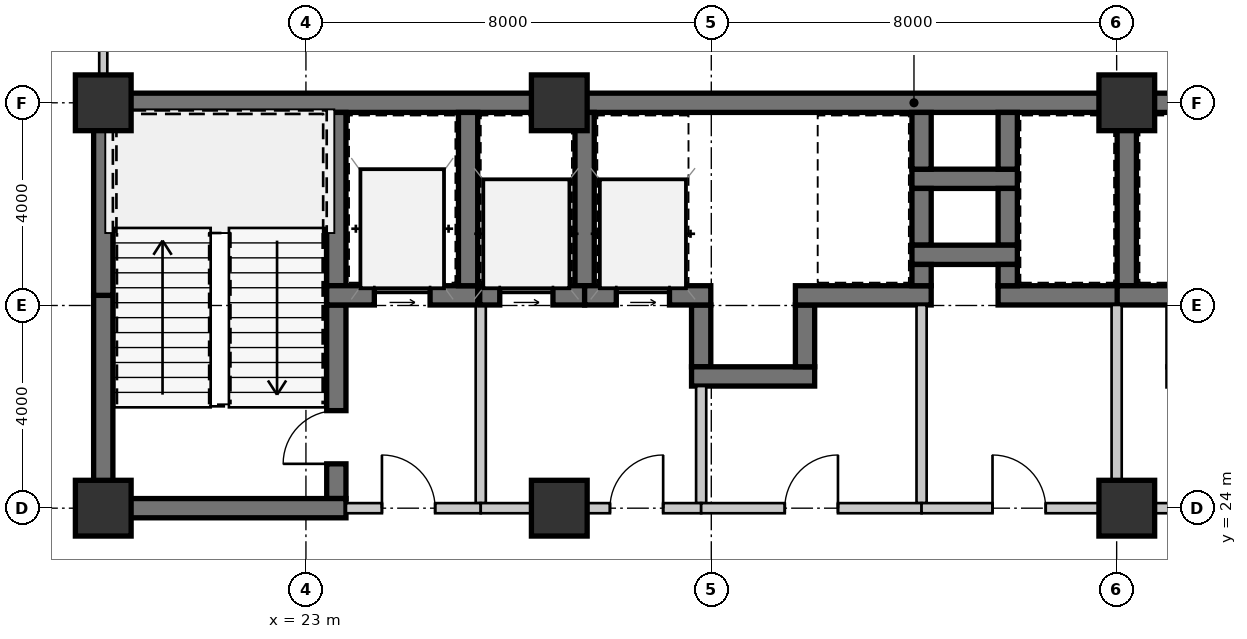
"""IFC4 building model, lengths in metres.
Left out: names, types, materials, properties, quantities, classifications, styles, units other than length and angle.
Written with IfcOpenShell. Run it as: python <this file> out.ifc"""

import sys

from ifc_helpers import new_model, si_unit, direction, frame, frame_2d, origin, origin_2d, place, context, subcontext, project, spatial, rectangle, extrude, source, transform, mapped, element, fill, save


model = new_model("IFC4")
c1 = context("Model", 3, precision=1e-05, world=origin(), true_north=direction((0.0, 1.0)))
c2 = subcontext(c1, "Body", "Model", "MODEL_VIEW")
j1 = project(units=[si_unit("LENGTHUNIT", "METRE"), si_unit("PLANEANGLEUNIT", "RADIAN")], contexts=[c1])
p1 = place(None, origin())
s1 = spatial("IfcSite", under=j1, at=p1, CompositionType="ELEMENT")
p2 = place(p1, origin())
s2 = spatial("IfcBuilding", under=s1, at=p2, CompositionType="ELEMENT")
p3 = place(p2, frame((0.0, 0.0, 8.4)))
s3 = spatial("IfcBuildingStorey", under=s2, at=p3, CompositionType="ELEMENT", Elevation=8.4)
m1 = source(origin(), c2, "Body", "SweptSolid", [
    extrude(rectangle(XDim=1.1, YDim=1.1, at=origin_2d()), origin(), (0.0, 0.0, 1.0), 4.55),
])
for number, where, z_axis, x_axis in (
    (1, (19.0, 24.0, 0.0), (0.0, 0.0, 1.0), (1.0, 0.0, 0.0)),
    (2, (28.0, 24.0, 0.0), (0.0, 0.0, 1.0), (1.0, 0.0, 0.0)),
    (3, (39.2, 24.0, 0.0), (0.0, 0.0, 1.0), (1.0, 0.0, 0.0)),
    (4, (19.0, 32.0, 0.0), (0.0, 0.0, 1.0), (1.0, 0.0, 0.0)),
    (5, (28.0, 32.0, 0.0), (0.0, 0.0, 1.0), (1.0, 0.0, 0.0)),
    (6, (39.2, 32.0, 0.0), (0.0, 0.0, 1.0), (1.0, 0.0, 0.0)),
):
    element("IfcColumn", number, at=place(p3, frame(where, z_axis=z_axis, x_axis=x_axis)), inside=s3, PredefinedType="COLUMN", context=c2, shape_type="MappedRepresentation", body=[
        mapped(m1, transform((0.0, 0.0, 0.0), scale=1.0)),
    ])
m2 = source(origin(), c2, "Body", "SweptSolid", [
    extrude(rectangle(XDim=9.19, YDim=0.38, at=frame_2d((4.595, 0.0))), origin(), (0.0, 0.0, 1.0), 4.29),
])
p4 = place(p3, frame((18.81, 32.0, 0.0), z_axis=(0.0, 0.0, 1.0), x_axis=(1.0, 0.0, 0.0)))
e7 = element("IfcWall", 7, at=p4, inside=s3, PredefinedType="SHEAR", context=c2, shape_type="MappedRepresentation", body=[
    mapped(m2, transform((0.0, 0.0, 0.0), scale=1.0)),
])
m3 = source(origin(), c2, "Body", "SweptSolid", [
    extrude(rectangle(XDim=11.2, YDim=0.38, at=frame_2d((5.6, 0.0))), origin(), (0.0, 0.0, 1.0), 4.29),
])
p5 = place(p3, frame((28.0, 32.0, 0.0), z_axis=(0.0, 0.0, 1.0), x_axis=(1.0, 0.0, 0.0)))
e8 = element("IfcWall", 8, at=p5, inside=s3, PredefinedType="SHEAR", context=c2, shape_type="MappedRepresentation", body=[
    mapped(m3, transform((0.0, 0.0, 0.0), scale=1.0)),
])
m4 = source(origin(), c2, "Body", "SweptSolid", [
    extrude(rectangle(XDim=11.99, YDim=0.38, at=frame_2d((5.995, 0.0))), origin(), (0.0, 0.0, 1.0), 4.29),
])
p6 = place(p3, frame((39.2, 32.0, 0.0), z_axis=(0.0, 0.0, 1.0), x_axis=(1.0, 0.0, 0.0)))
e9 = element("IfcWall", 9, at=p6, inside=s3, PredefinedType="SHEAR", context=c2, shape_type="MappedRepresentation", body=[
    mapped(m4, transform((0.0, 0.0, 0.0), scale=1.0)),
])
m5 = source(origin(), c2, "Body", "SweptSolid", [
    extrude(rectangle(XDim=4.01, YDim=0.38, at=frame_2d((2.005, 0.0))), origin(), (0.0, 0.0, 1.0), 4.29),
])
p7 = place(p3, frame((19.0, 24.19, 0.0), z_axis=(0.0, 0.0, 1.0), x_axis=(0.0, 1.0, 0.0)))
e10 = element("IfcWall", 10, at=p7, inside=s3, PredefinedType="SHEAR", context=c2, shape_type="MappedRepresentation", body=[
    mapped(m5, transform((0.0, 0.0, 0.0), scale=1.0)),
])
m6 = source(origin(), c2, "Body", "SweptSolid", [
    extrude(rectangle(XDim=3.61, YDim=0.38, at=frame_2d((1.805, 0.0))), origin(), (0.0, 0.0, 1.0), 4.29),
])
p8 = place(p3, frame((19.0, 28.2, 0.0), z_axis=(0.0, 0.0, 1.0), x_axis=(0.0, 1.0, 0.0)))
e11 = element("IfcWall", 11, at=p8, inside=s3, PredefinedType="SHEAR", context=c2, shape_type="MappedRepresentation", body=[
    mapped(m6, transform((0.0, 0.0, 0.0), scale=1.0)),
])
m7 = source(origin(), c2, "Body", "SweptSolid", [
    extrude(rectangle(XDim=3.42, YDim=0.38, at=frame_2d((1.71, 0.0))), origin(), (0.0, 0.0, 1.0), 4.29),
])
p9 = place(p3, frame((23.6, 28.39, 0.0), z_axis=(0.0, 0.0, 1.0), x_axis=(0.0, 1.0, 0.0)))
e12 = element("IfcWall", 12, at=p9, inside=s3, PredefinedType="SHEAR", context=c2, shape_type="MappedRepresentation", body=[
    mapped(m7, transform((0.0, 0.0, 0.0), scale=1.0)),
])
m8 = source(origin(), c2, "Body", "SweptSolid", [
    extrude(rectangle(XDim=3.82, YDim=0.38, at=frame_2d((1.91, 0.0))), origin(), (0.0, 0.0, 1.0), 4.29),
])
p10 = place(p3, frame((23.6, 24.19, 0.0), z_axis=(0.0, 0.0, 1.0), x_axis=(0.0, 1.0, 0.0)))
e13 = element("IfcWall", 13, at=p10, inside=s3, PredefinedType="SHEAR", context=c2, shape_type="MappedRepresentation", body=[
    mapped(m8, transform((0.0, 0.0, 0.0), scale=1.0)),
])
m9 = source(origin(), c2, "Body", "SweptSolid", [
    extrude(rectangle(XDim=1.05, YDim=2.1, at=frame_2d((0.525, 1.05))), frame((0.0, 0.2, 0.0), z_axis=(0.0, -1.0, 0.0), x_axis=(1.0, 0.0, 0.0)), (0.0, 0.0, 1.0), 0.4),
])
p11 = place(p10, frame((0.685, 0.0, 0.0)))
e14 = element("IfcOpeningElement", 14, at=p11, cuts=e13, PredefinedType="OPENING", context=c2, shape_type="MappedRepresentation", body=[
    mapped(m9, transform((0.0, 0.0, 0.0), scale=1.0)),
])
m10 = source(origin(), c2, "Body", "SweptSolid", [
    extrude(rectangle(XDim=4.98, YDim=0.38, at=frame_2d((2.49, 0.0))), origin(), (0.0, 0.0, 1.0), 4.29),
])
p12 = place(p3, frame((18.81, 24.0, 0.0), z_axis=(0.0, 0.0, 1.0), x_axis=(1.0, 0.0, 0.0)))
e15 = element("IfcWall", 15, at=p12, inside=s3, PredefinedType="SHEAR", context=c2, shape_type="MappedRepresentation", body=[
    mapped(m10, transform((0.0, 0.0, 0.0), scale=1.0)),
])
m11 = source(origin(), c2, "Body", "SweptSolid", [
    extrude(rectangle(XDim=2.98, YDim=0.38, at=frame_2d((1.49, 0.0))), origin(), (0.0, 0.0, 1.0), 4.29),
])
p13 = place(p3, frame((23.41, 28.2, 0.0), z_axis=(0.0, 0.0, 1.0), x_axis=(1.0, 0.0, 0.0)))
e16 = element("IfcWall", 16, at=p13, inside=s3, PredefinedType="SHEAR", context=c2, shape_type="MappedRepresentation", body=[
    mapped(m11, transform((0.0, 0.0, 0.0), scale=1.0)),
])
m12 = source(origin(), c2, "Body", "SweptSolid", [
    extrude(rectangle(XDim=1.1, YDim=2.15, at=frame_2d((0.55, 1.075))), frame((0.0, 0.2, 0.0), z_axis=(0.0, -1.0, 0.0), x_axis=(1.0, 0.0, 0.0)), (0.0, 0.0, 1.0), 0.4),
])
p14 = place(p13, frame((0.94, 0.0, 0.0)))
e17 = element("IfcOpeningElement", 17, at=p14, cuts=e16, PredefinedType="OPENING", context=c2, shape_type="MappedRepresentation", body=[
    mapped(m12, transform((0.0, 0.0, 0.0), scale=1.0)),
])
p15 = place(p3, frame((26.2, 28.39, 0.0), z_axis=(0.0, 0.0, 1.0), x_axis=(0.0, 1.0, 0.0)))
e18 = element("IfcWall", 18, at=p15, inside=s3, PredefinedType="SHEAR", context=c2, shape_type="MappedRepresentation", body=[
    mapped(m7, transform((0.0, 0.0, 0.0), scale=1.0)),
])
m13 = source(origin(), c2, "Body", "SweptSolid", [
    extrude(rectangle(XDim=3.91, YDim=0.2, at=frame_2d((1.955, 0.0))), origin(), (0.0, 0.0, 1.0), 4.29),
])
p16 = place(p3, frame((26.45, 24.1, 0.0), z_axis=(0.0, 0.0, 1.0), x_axis=(0.0, 1.0, 0.0)))
e19 = element("IfcWall", 19, at=p16, inside=s3, PredefinedType="SOLIDWALL", context=c2, shape_type="MappedRepresentation", body=[
    mapped(m13, transform((0.0, 0.0, 0.0), scale=1.0)),
])
m14 = source(origin(), c2, "Body", "SweptSolid", [
    extrude(rectangle(XDim=2.66, YDim=0.2, at=frame_2d((1.33, 0.0))), origin(), (0.0, 0.0, 1.0), 3.83),
])
p17 = place(p3, frame((23.79, 24.0, 0.0), z_axis=(0.0, 0.0, 1.0), x_axis=(1.0, 0.0, 0.0)))
e20 = element("IfcWall", 20, at=p17, inside=s3, PredefinedType="SOLIDWALL", context=c2, shape_type="MappedRepresentation", body=[
    mapped(m14, transform((0.0, 0.0, 0.0), scale=1.0)),
])
m15 = source(origin(), c2, "Body", "SweptSolid", [
    extrude(rectangle(XDim=1.05, YDim=2.1, at=frame_2d((0.525, 1.05))), frame((0.0, 0.11, 0.0), z_axis=(0.0, -1.0, 0.0), x_axis=(1.0, 0.0, 0.0)), (0.0, 0.0, 1.0), 0.22),
])
p18 = place(p17, frame((0.71, 0.0, 0.0)))
e21 = element("IfcOpeningElement", 21, at=p18, cuts=e20, PredefinedType="OPENING", context=c2, shape_type="MappedRepresentation", body=[
    mapped(m15, transform((0.0, 0.0, 0.0), scale=1.0)),
])
m16 = source(origin(), c2, "Body", "SweptSolid", [
    extrude(rectangle(XDim=2.08, YDim=0.38, at=frame_2d((1.04, 0.0))), origin(), (0.0, 0.0, 1.0), 4.29),
])
p19 = place(p3, frame((34.96, 30.5, 0.0), z_axis=(0.0, 0.0, 1.0), x_axis=(1.0, 0.0, 0.0)))
e22 = element("IfcWall", 22, at=p19, inside=s3, PredefinedType="SHEAR", context=c2, shape_type="MappedRepresentation", body=[
    mapped(m16, transform((0.0, 0.0, 0.0), scale=1.0)),
])
m17 = source(origin(), c2, "Body", "SweptSolid", [
    extrude(rectangle(XDim=1.12, YDim=0.38, at=frame_2d((0.56, 0.0))), origin(), (0.0, 0.0, 1.0), 4.29),
])
for number, where, z_axis, x_axis in (
    (23, (35.15, 31.81, 0.0), (0.0, 0.0, 1.0), (0.0, -1.0, 0.0)),
    (24, (36.85, 30.69, 0.0), (0.0, 0.0, 1.0), (0.0, 1.0, 0.0)),
    (25, (35.15, 30.31, 0.0), (0.0, 0.0, 1.0), (0.0, -1.0, 0.0)),
    (26, (36.85, 29.19, 0.0), (0.0, 0.0, 1.0), (0.0, 1.0, 0.0)),
):
    element("IfcWall", number, at=place(p3, frame(where, z_axis=z_axis, x_axis=x_axis)), inside=s3, PredefinedType="SHEAR", context=c2, shape_type="MappedRepresentation", body=[
        mapped(m17, transform((0.0, 0.0, 0.0), scale=1.0)),
    ])
p20 = place(p3, frame((34.96, 29.0, 0.0), z_axis=(0.0, 0.0, 1.0), x_axis=(1.0, 0.0, 0.0)))
e27 = element("IfcWall", 27, at=p20, inside=s3, PredefinedType="SHEAR", context=c2, shape_type="MappedRepresentation", body=[
    mapped(m16, transform((0.0, 0.0, 0.0), scale=1.0)),
])
m18 = source(origin(), c2, "Body", "SweptSolid", [
    extrude(rectangle(XDim=1.22, YDim=0.38, at=frame_2d((0.61, 0.0))), origin(), (0.0, 0.0, 1.0), 4.29),
])
p21 = place(p3, frame((30.8, 28.01, 0.0), z_axis=(0.0, 0.0, 1.0), x_axis=(0.0, -1.0, 0.0)))
e28 = element("IfcWall", 28, at=p21, inside=s3, PredefinedType="SHEAR", context=c2, shape_type="MappedRepresentation", body=[
    mapped(m18, transform((0.0, 0.0, 0.0), scale=1.0)),
])
m19 = source(origin(), c2, "Body", "SweptSolid", [
    extrude(rectangle(XDim=2.43, YDim=0.38, at=frame_2d((1.215, 0.0))), origin(), (0.0, 0.0, 1.0), 4.29),
])
p22 = place(p3, frame((30.61, 26.6, 0.0), z_axis=(0.0, 0.0, 1.0), x_axis=(1.0, 0.0, 0.0)))
e29 = element("IfcWall", 29, at=p22, inside=s3, PredefinedType="SHEAR", context=c2, shape_type="MappedRepresentation", body=[
    mapped(m19, transform((0.0, 0.0, 0.0), scale=1.0)),
])
p23 = place(p3, frame((32.85, 26.79, 0.0), z_axis=(0.0, 0.0, 1.0), x_axis=(0.0, 1.0, 0.0)))
e30 = element("IfcWall", 30, at=p23, inside=s3, PredefinedType="SHEAR", context=c2, shape_type="MappedRepresentation", body=[
    mapped(m18, transform((0.0, 0.0, 0.0), scale=1.0)),
])
p24 = place(p3, frame((28.5, 28.39, 0.0), z_axis=(0.0, 0.0, 1.0), x_axis=(0.0, 1.0, 0.0)))
e31 = element("IfcWall", 31, at=p24, inside=s3, PredefinedType="SHEAR", context=c2, shape_type="MappedRepresentation", body=[
    mapped(m7, transform((0.0, 0.0, 0.0), scale=1.0)),
])
m20 = source(origin(), c2, "Body", "SweptSolid", [
    extrude(rectangle(XDim=2.07, YDim=0.38, at=frame_2d((1.035, 0.0))), origin(), (0.0, 0.0, 1.0), 4.29),
])
p25 = place(p3, frame((26.43, 28.2, 0.0), z_axis=(0.0, 0.0, 1.0), x_axis=(1.0, 0.0, 0.0)))
e32 = element("IfcWall", 32, at=p25, inside=s3, PredefinedType="SHEAR", context=c2, shape_type="MappedRepresentation", body=[
    mapped(m20, transform((0.0, 0.0, 0.0), scale=1.0)),
])
m21 = source(origin(), c2, "Body", "SweptSolid", [
    extrude(rectangle(XDim=1.05, YDim=2.15, at=frame_2d((0.525, 1.075))), frame((0.0, 0.2, 0.0), z_axis=(0.0, -1.0, 0.0), x_axis=(1.0, 0.0, 0.0)), (0.0, 0.0, 1.0), 0.4),
])
p26 = place(p25, frame((0.395, 0.0, 0.0)))
e33 = element("IfcOpeningElement", 33, at=p26, cuts=e32, PredefinedType="OPENING", context=c2, shape_type="MappedRepresentation", body=[
    mapped(m21, transform((0.0, 0.0, 0.0), scale=1.0)),
])
m22 = source(origin(), c2, "Body", "SweptSolid", [
    extrude(rectangle(XDim=2.49, YDim=0.38, at=frame_2d((1.245, 0.0))), origin(), (0.0, 0.0, 1.0), 4.29),
])
p27 = place(p3, frame((28.5, 28.2, 0.0), z_axis=(0.0, 0.0, 1.0), x_axis=(1.0, 0.0, 0.0)))
e34 = element("IfcWall", 34, at=p27, inside=s3, PredefinedType="SHEAR", context=c2, shape_type="MappedRepresentation", body=[
    mapped(m22, transform((0.0, 0.0, 0.0), scale=1.0)),
])
p28 = place(p27, frame((0.625, 0.0, 0.0)))
e35 = element("IfcOpeningElement", 35, at=p28, cuts=e34, PredefinedType="OPENING", context=c2, shape_type="MappedRepresentation", body=[
    mapped(m21, transform((0.0, 0.0, 0.0), scale=1.0)),
])
m23 = source(origin(), c2, "Body", "SweptSolid", [
    extrude(rectangle(XDim=2.31, YDim=0.2, at=frame_2d((1.155, 0.0))), origin(), (0.0, 0.0, 1.0), 4.29),
])
p29 = place(p3, frame((30.8, 26.41, 0.0), z_axis=(0.0, 0.0, 1.0), x_axis=(0.0, -1.0, 0.0)))
e36 = element("IfcWall", 36, at=p29, inside=s3, PredefinedType="SOLIDWALL", context=c2, shape_type="MappedRepresentation", body=[
    mapped(m23, transform((0.0, 0.0, 0.0), scale=1.0)),
])
m24 = source(origin(), c2, "Body", "SweptSolid", [
    extrude(rectangle(XDim=4.35, YDim=0.2, at=frame_2d((2.175, 0.0))), origin(), (0.0, 0.0, 1.0), 3.83),
])
p30 = place(p3, frame((30.8, 24.0, 0.0), z_axis=(0.0, 0.0, 1.0), x_axis=(-1.0, 0.0, 0.0)))
e37 = element("IfcWall", 37, at=p30, inside=s3, PredefinedType="SOLIDWALL", context=c2, shape_type="MappedRepresentation", body=[
    mapped(m24, transform((0.0, 0.0, 0.0), scale=1.0)),
])
p31 = place(p30, frame((0.75, 0.0, 0.0)))
e38 = element("IfcOpeningElement", 38, at=p31, cuts=e37, PredefinedType="OPENING", context=c2, shape_type="MappedRepresentation", body=[
    mapped(m15, transform((0.0, 0.0, 0.0), scale=1.0)),
])
m25 = source(origin(), c2, "Body", "SweptSolid", [
    extrude(rectangle(XDim=2.68, YDim=0.38, at=frame_2d((1.34, 0.0))), origin(), (0.0, 0.0, 1.0), 4.29),
])
p32 = place(p3, frame((32.66, 28.2, 0.0), z_axis=(0.0, 0.0, 1.0), x_axis=(1.0, 0.0, 0.0)))
e39 = element("IfcWall", 39, at=p32, inside=s3, PredefinedType="SHEAR", context=c2, shape_type="MappedRepresentation", body=[
    mapped(m25, transform((0.0, 0.0, 0.0), scale=1.0)),
])
m26 = source(origin(), c2, "Body", "SweptSolid", [
    extrude(rectangle(XDim=0.42, YDim=0.38, at=frame_2d((0.21, 0.0))), origin(), (0.0, 0.0, 1.0), 4.29),
])
p33 = place(p3, frame((35.15, 28.39, 0.0), z_axis=(0.0, 0.0, 1.0), x_axis=(0.0, 1.0, 0.0)))
e40 = element("IfcWall", 40, at=p33, inside=s3, PredefinedType="SHEAR", context=c2, shape_type="MappedRepresentation", body=[
    mapped(m26, transform((0.0, 0.0, 0.0), scale=1.0)),
])
p34 = place(p3, frame((39.2, 28.39, 0.0), z_axis=(0.0, 0.0, 1.0), x_axis=(0.0, 1.0, 0.0)))
e41 = element("IfcWall", 41, at=p34, inside=s3, PredefinedType="SHEAR", context=c2, shape_type="MappedRepresentation", body=[
    mapped(m7, transform((0.0, 0.0, 0.0), scale=1.0)),
])
m27 = source(origin(), c2, "Body", "SweptSolid", [
    extrude(rectangle(XDim=2.36, YDim=0.38, at=frame_2d((1.18, 0.0))), origin(), (0.0, 0.0, 1.0), 4.29),
])
p35 = place(p3, frame((36.66, 28.2, 0.0), z_axis=(0.0, 0.0, 1.0), x_axis=(1.0, 0.0, 0.0)))
e42 = element("IfcWall", 42, at=p35, inside=s3, PredefinedType="SHEAR", context=c2, shape_type="MappedRepresentation", body=[
    mapped(m27, transform((0.0, 0.0, 0.0), scale=1.0)),
])
p36 = place(p3, frame((36.85, 28.81, 0.0), z_axis=(0.0, 0.0, 1.0), x_axis=(0.0, -1.0, 0.0)))
e43 = element("IfcWall", 43, at=p36, inside=s3, PredefinedType="SHEAR", context=c2, shape_type="MappedRepresentation", body=[
    mapped(m26, transform((0.0, 0.0, 0.0), scale=1.0)),
])
m28 = source(origin(), c2, "Body", "SweptSolid", [
    extrude(rectangle(XDim=1.21, YDim=0.38, at=frame_2d((0.605, 0.0))), origin(), (0.0, 0.0, 1.0), 4.29),
])
p37 = place(p3, frame((39.01, 28.2, 0.0), z_axis=(0.0, 0.0, 1.0), x_axis=(1.0, 0.0, 0.0)))
e44 = element("IfcWall", 44, at=p37, inside=s3, PredefinedType="SHEAR", context=c2, shape_type="MappedRepresentation", body=[
    mapped(m28, transform((0.0, 0.0, 0.0), scale=1.0)),
])
p38 = place(p3, frame((35.15, 28.01, 0.0), z_axis=(0.0, 0.0, 1.0), x_axis=(0.0, -1.0, 0.0)))
e45 = element("IfcWall", 45, at=p38, inside=s3, PredefinedType="SOLIDWALL", context=c2, shape_type="MappedRepresentation", body=[
    mapped(m13, transform((0.0, 0.0, 0.0), scale=1.0)),
])
m29 = source(origin(), c2, "Body", "SweptSolid", [
    extrude(rectangle(XDim=4.35, YDim=0.2, at=frame_2d((2.175, 0.0))), origin(), (0.0, 0.0, 1.0), 3.83),
])
p39 = place(p3, frame((35.15, 24.0, 0.0), z_axis=(0.0, 0.0, 1.0), x_axis=(-1.0, 0.0, 0.0)))
e46 = element("IfcWall", 46, at=p39, inside=s3, PredefinedType="SOLIDWALL", context=c2, shape_type="MappedRepresentation", body=[
    mapped(m29, transform((0.0, 0.0, 0.0), scale=1.0)),
])
p40 = place(p39, frame((1.65, 0.0, 0.0)))
e47 = element("IfcOpeningElement", 47, at=p40, cuts=e46, PredefinedType="OPENING", context=c2, shape_type="MappedRepresentation", body=[
    mapped(m15, transform((0.0, 0.0, 0.0), scale=1.0)),
])
p41 = place(p3, frame((39.0, 28.01, 0.0), z_axis=(0.0, 0.0, 1.0), x_axis=(0.0, -1.0, 0.0)))
e48 = element("IfcWall", 48, at=p41, inside=s3, PredefinedType="SOLIDWALL", context=c2, shape_type="MappedRepresentation", body=[
    mapped(m13, transform((0.0, 0.0, 0.0), scale=1.0)),
])
m30 = source(origin(), c2, "Body", "SweptSolid", [
    extrude(rectangle(XDim=3.85, YDim=0.2, at=frame_2d((1.925, 0.0))), origin(), (0.0, 0.0, 1.0), 3.83),
])
p42 = place(p3, frame((39.0, 24.0, 0.0), z_axis=(0.0, 0.0, 1.0), x_axis=(-1.0, 0.0, 0.0)))
e49 = element("IfcWall", 49, at=p42, inside=s3, PredefinedType="SOLIDWALL", context=c2, shape_type="MappedRepresentation", body=[
    mapped(m30, transform((0.0, 0.0, 0.0), scale=1.0)),
])
p43 = place(p42, frame((1.4, 0.0, 0.0)))
e50 = element("IfcOpeningElement", 50, at=p43, cuts=e49, PredefinedType="OPENING", context=c2, shape_type="MappedRepresentation", body=[
    mapped(m15, transform((0.0, 0.0, 0.0), scale=1.0)),
])
m31 = source(origin(), c2, "Body", "SweptSolid", [
    extrude(rectangle(XDim=4.55, YDim=0.2, at=frame_2d((2.275, 0.0))), origin(), (0.0, 0.0, 1.0), 3.757),
])
p44 = place(p3, frame((43.55, 24.0, 0.0), z_axis=(0.0, 0.0, 1.0), x_axis=(-1.0, 0.0, 0.0)))
e51 = element("IfcWall", 51, at=p44, inside=s3, PredefinedType="SOLIDWALL", context=c2, shape_type="MappedRepresentation", body=[
    mapped(m31, transform((0.0, 0.0, 0.0), scale=1.0)),
])
p45 = place(p44, frame((1.75, 0.0, 0.0)))
e52 = element("IfcOpeningElement", 52, at=p45, cuts=e51, PredefinedType="OPENING", context=c2, shape_type="MappedRepresentation", body=[
    mapped(m15, transform((0.0, 0.0, 0.0), scale=1.0)),
])
m32 = source(origin(), c2, "Body", "SweptSolid", [
    extrude(rectangle(XDim=7.58, YDim=0.16, at=frame_2d((3.79, 0.0))), origin(), (0.0, 0.0, 1.0), 4.29),
])
p46 = place(p3, frame((19.0, 39.77, 0.0), z_axis=(0.0, 0.0, 1.0), x_axis=(0.0, -1.0, 0.0)))
e53 = element("IfcWall", 53, at=p46, inside=s3, PredefinedType="PARTITIONING", context=c2, shape_type="MappedRepresentation", body=[
    mapped(m32, transform((0.0, 0.0, 0.0), scale=1.0)),
])
m33 = source(origin(), c2, "Body", "SweptSolid", [
    extrude(rectangle(XDim=1.05, YDim=2.1, at=frame_2d((0.525, 1.05))), frame((0.0, 0.025, 0.0), z_axis=(0.0, -1.0, 0.0), x_axis=(1.0, 0.0, 0.0)), (0.0, 0.0, 1.0), 0.05),
])
p47 = place(p11, origin())
e54 = element("IfcDoor", 54, at=p47, inside=s3, OperationType="SINGLE_SWING_LEFT", PredefinedType="DOOR", context=c2, shape_type="MappedRepresentation", body=[
    mapped(m33, transform((0.0, 0.0, 0.0), scale=1.0)),
])
fill(e14, e54)
m34 = source(origin(), c2, "Body", "SweptSolid", [
    extrude(rectangle(XDim=1.1, YDim=2.15, at=frame_2d((0.55, 1.075))), frame((0.0, 0.025, 0.0), z_axis=(0.0, -1.0, 0.0), x_axis=(1.0, 0.0, 0.0)), (0.0, 0.0, 1.0), 0.05),
])
p48 = place(p14, origin())
e55 = element("IfcDoor", 55, at=p48, inside=s3, OperationType="SLIDING_TO_LEFT", PredefinedType="DOOR", context=c2, shape_type="MappedRepresentation", body=[
    mapped(m34, transform((0.0, 0.0, 0.0), scale=1.0)),
])
fill(e17, e55)
p49 = place(p18, origin())
e56 = element("IfcDoor", 56, at=p49, inside=s3, OperationType="SINGLE_SWING_LEFT", PredefinedType="DOOR", context=c2, shape_type="MappedRepresentation", body=[
    mapped(m33, transform((0.0, 0.0, 0.0), scale=1.0)),
])
fill(e21, e56)
m35 = source(origin(), c2, "Body", "SweptSolid", [
    extrude(rectangle(XDim=1.05, YDim=2.15, at=frame_2d((0.525, 1.075))), frame((0.0, 0.025, 0.0), z_axis=(0.0, -1.0, 0.0), x_axis=(1.0, 0.0, 0.0)), (0.0, 0.0, 1.0), 0.05),
])
p50 = place(p26, origin())
e57 = element("IfcDoor", 57, at=p50, inside=s3, OperationType="SLIDING_TO_LEFT", PredefinedType="DOOR", context=c2, shape_type="MappedRepresentation", body=[
    mapped(m35, transform((0.0, 0.0, 0.0), scale=1.0)),
])
fill(e33, e57)
p51 = place(p28, origin())
e58 = element("IfcDoor", 58, at=p51, inside=s3, OperationType="SLIDING_TO_LEFT", PredefinedType="DOOR", context=c2, shape_type="MappedRepresentation", body=[
    mapped(m35, transform((0.0, 0.0, 0.0), scale=1.0)),
])
fill(e35, e58)
p52 = place(p31, frame((1.05, 0.0, 0.0), z_axis=(0.0, 0.0, 1.0), x_axis=(-1.0, 0.0, 0.0)))
e59 = element("IfcDoor", 59, at=p52, inside=s3, OperationType="SINGLE_SWING_RIGHT", PredefinedType="DOOR", context=c2, shape_type="MappedRepresentation", body=[
    mapped(m33, transform((0.0, 0.0, 0.0), scale=1.0)),
])
fill(e38, e59)
p53 = place(p40, frame((1.05, 0.0, 0.0), z_axis=(0.0, 0.0, 1.0), x_axis=(-1.0, 0.0, 0.0)))
e60 = element("IfcDoor", 60, at=p53, inside=s3, OperationType="SINGLE_SWING_RIGHT", PredefinedType="DOOR", context=c2, shape_type="MappedRepresentation", body=[
    mapped(m33, transform((0.0, 0.0, 0.0), scale=1.0)),
])
fill(e47, e60)
p54 = place(p43, frame((1.05, 0.0, 0.0), z_axis=(0.0, 0.0, 1.0), x_axis=(-1.0, 0.0, 0.0)))
e61 = element("IfcDoor", 61, at=p54, inside=s3, OperationType="SINGLE_SWING_LEFT", PredefinedType="DOOR", context=c2, shape_type="MappedRepresentation", body=[
    mapped(m33, transform((0.0, 0.0, 0.0), scale=1.0)),
])
fill(e50, e61)
save(model, sys.argv[1])
